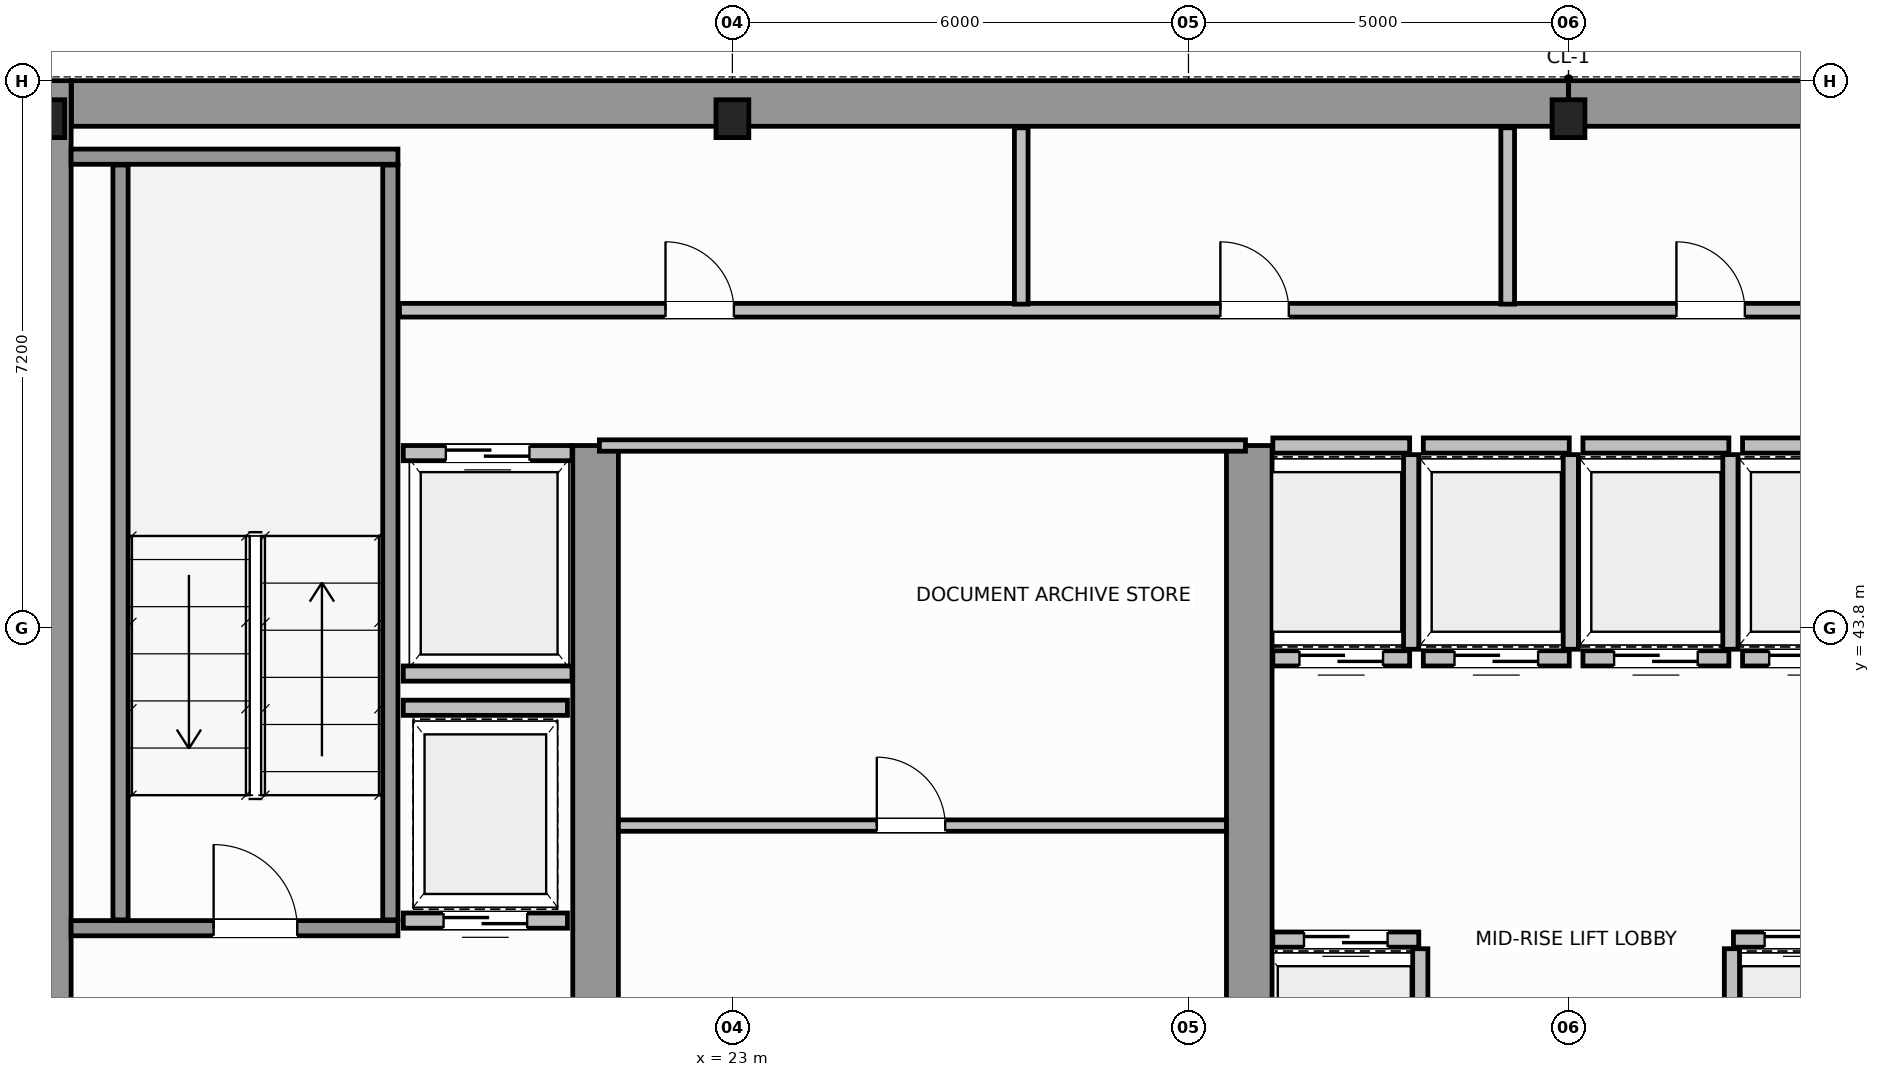
"""IFC4 building model, lengths in metres.
Left out: names, types, materials, properties, quantities, classifications, styles, units other than length and angle.
Written with IfcOpenShell. Run it as: python <this file> out.ifc"""

import sys

from ifc_helpers import new_model, si_unit, direction, frame, frame_2d, origin, origin_2d, place, context, subcontext, project, spatial, rectangle, i_section, extrude, source, transform, mapped, element, fill, save


model = new_model("IFC4")
c1 = context("Model", 3, precision=1e-05, world=origin(), true_north=direction((0.0, 1.0)))
c2 = subcontext(c1, "Body", "Model", "MODEL_VIEW")
j1 = project(units=[si_unit("LENGTHUNIT", "METRE"), si_unit("PLANEANGLEUNIT", "RADIAN")], contexts=[c1])
p1 = place(None, origin())
s1 = spatial("IfcSite", under=j1, at=p1, CompositionType="ELEMENT")
p2 = place(p1, origin())
s2 = spatial("IfcBuilding", under=s1, at=p2, CompositionType="ELEMENT")
p3 = place(p2, frame((0.0, 0.0, 195.6)))
s3 = spatial("IfcBuildingStorey", under=s2, at=p3, CompositionType="ELEMENT", Elevation=195.6)
m1 = source(origin(), c2, "Body", "SweptSolid", [
    extrude(i_section(OverallWidth=0.432, OverallDepth=0.498, WebThickness=0.055, FlangeThickness=0.068, FilletRadius=0.015, at=origin_2d()), origin(), (0.0, 0.0, 1.0), 3.8),
])
for number, where, z_axis, x_axis in (
    (1, (14.0, 50.5, 0.0), (0.0, 0.0, 1.0), (1.0, 0.0, 0.0)),
    (2, (23.0, 50.5, 0.0), (0.0, 0.0, 1.0), (1.0, 0.0, 0.0)),
    (3, (34.0, 50.5, 0.0), (0.0, 0.0, 1.0), (1.0, 0.0, 0.0)),
):
    element("IfcColumn", number, at=place(p3, frame(where, z_axis=z_axis, x_axis=x_axis)), inside=s3, PredefinedType="COLUMN", context=c2, shape_type="MappedRepresentation", body=[
        mapped(m1, transform((0.0, 0.0, 0.0), scale=1.0)),
    ])
for number, where, z_axis, x_axis in (
    (4, (14.304, 50.7, 0.0), (0.0, 0.0, 1.0), (1.0, 0.0, 0.0)),
    (5, (34.002, 50.7, 0.0), (0.0, 0.0, 1.0), (1.0, 0.0, 0.0)),
):
    element("IfcWall", number, at=place(p3, frame(where, z_axis=z_axis, x_axis=x_axis)), inside=s3, PredefinedType="SHEAR", context=c2, shape_type="SweptSolid", body=[
        extrude(rectangle(XDim=19.694, YDim=0.6, at=frame_2d((9.847, 0.0))), origin(), (0.0, 0.0, 1.0), 3.8),
    ])
p4 = place(p3, frame((14.0, 36.5, 0.0), z_axis=(0.0, 0.0, 1.0), x_axis=(0.0, 1.0, 0.0)))
e6 = element("IfcWall", 6, at=p4, inside=s3, PredefinedType="SHEAR", context=c2, shape_type="SweptSolid", body=[
    extrude(rectangle(XDim=14.5, YDim=0.6, at=frame_2d((7.25, 0.0))), origin(), (0.0, 0.0, 1.0), 3.8),
])
for number, where, z_axis, x_axis in (
    (7, (21.2, 36.82, 0.0), (0.0, 0.0, 1.0), (0.0, 1.0, 0.0)),
    (8, (29.8, 36.82, 0.0), (0.0, 0.0, 1.0), (0.0, 1.0, 0.0)),
):
    element("IfcWall", number, at=place(p3, frame(where, z_axis=z_axis, x_axis=x_axis)), inside=s3, PredefinedType="SHEAR", context=c2, shape_type="SweptSolid", body=[
        extrude(rectangle(XDim=9.38, YDim=0.6, at=frame_2d((4.69, 0.0))), origin(), (0.0, 0.0, 1.0), 3.8),
    ])
p5 = place(p3, frame((14.3, 39.85, 0.0), z_axis=(0.0, 0.0, 1.0), x_axis=(1.0, 0.0, 0.0)))
e9 = element("IfcWall", 9, at=p5, inside=s3, PredefinedType="SOLIDWALL", context=c2, shape_type="SweptSolid", body=[
    extrude(rectangle(XDim=4.3, YDim=0.2, at=frame_2d((2.15, 0.0))), origin(), (0.0, 0.0, 1.0), 3.8),
])
p6 = place(p5, frame((1.875, 0.0, 0.0)))
e10 = element("IfcOpeningElement", 10, at=p6, cuts=e9, PredefinedType="OPENING", context=c2, shape_type="SweptSolid", body=[
    extrude(rectangle(XDim=1.1, YDim=2.15, at=frame_2d((0.55, 1.075))), frame((0.0, 0.11, 0.0), z_axis=(0.0, -1.0, 0.0), x_axis=(1.0, 0.0, 0.0)), (0.0, 0.0, 1.0), 0.22),
])
p7 = place(p3, frame((14.3, 50.0, 0.0), z_axis=(0.0, 0.0, 1.0), x_axis=(1.0, 0.0, 0.0)))
e11 = element("IfcWall", 11, at=p7, inside=s3, PredefinedType="SOLIDWALL", context=c2, shape_type="SweptSolid", body=[
    extrude(rectangle(XDim=4.3, YDim=0.2, at=frame_2d((2.15, 0.0))), origin(), (0.0, 0.0, 1.0), 3.8),
])
for number, where, z_axis, x_axis in (
    (12, (14.95, 39.96, 0.0), (0.0, 0.0, 1.0), (0.0, 1.0, 0.0)),
    (13, (18.5, 39.96, 0.0), (0.0, 0.0, 1.0), (0.0, 1.0, 0.0)),
):
    element("IfcWall", number, at=place(p3, frame(where, z_axis=z_axis, x_axis=x_axis)), inside=s3, PredefinedType="SOLIDWALL", context=c2, shape_type="SweptSolid", body=[
        extrude(rectangle(XDim=9.93, YDim=0.2, at=frame_2d((4.965, 0.0))), origin(), (0.0, 0.0, 1.0), 3.8),
    ])
p8 = place(p3, frame((30.11, 39.7, 0.0), z_axis=(0.0, 0.0, 1.0), x_axis=(1.0, 0.0, 0.0)))
e14 = element("IfcWall", 14, at=p8, inside=s3, PredefinedType="SOLIDWALL", context=c2, shape_type="SweptSolid", body=[
    extrude(rectangle(XDim=1.92, YDim=0.2, at=frame_2d((0.96, 0.0))), origin(), (0.0, 0.0, 1.0), 3.58),
])
p9 = place(p8, frame((0.41, 0.0, 0.0)))
e15 = element("IfcOpeningElement", 15, at=p9, cuts=e14, PredefinedType="OPENING", context=c2, shape_type="SweptSolid", body=[
    extrude(rectangle(XDim=1.1, YDim=2.15, at=frame_2d((0.55, 1.075))), frame((0.0, 0.11, 0.0), z_axis=(0.0, -1.0, 0.0), x_axis=(1.0, 0.0, 0.0)), (0.0, 0.0, 1.0), 0.22),
])
p10 = place(p3, frame((32.05, 37.02, 0.0), z_axis=(0.0, 0.0, 1.0), x_axis=(0.0, 1.0, 0.0)))
e16 = element("IfcWall", 16, at=p10, inside=s3, PredefinedType="SOLIDWALL", context=c2, shape_type="SweptSolid", body=[
    extrude(rectangle(XDim=2.56, YDim=0.2, at=frame_2d((1.28, 0.0))), origin(), (0.0, 0.0, 1.0), 3.58),
])
p11 = place(p3, frame((36.17, 39.7, 0.0), z_axis=(0.0, 0.0, 1.0), x_axis=(1.0, 0.0, 0.0)))
e17 = element("IfcWall", 17, at=p11, inside=s3, PredefinedType="SOLIDWALL", context=c2, shape_type="SweptSolid", body=[
    extrude(rectangle(XDim=1.92, YDim=0.2, at=frame_2d((0.96, 0.0))), origin(), (0.0, 0.0, 1.0), 3.58),
])
p12 = place(p11, frame((0.41, 0.0, 0.0)))
e18 = element("IfcOpeningElement", 18, at=p12, cuts=e17, PredefinedType="OPENING", context=c2, shape_type="SweptSolid", body=[
    extrude(rectangle(XDim=1.1, YDim=2.15, at=frame_2d((0.55, 1.075))), frame((0.0, 0.11, 0.0), z_axis=(0.0, -1.0, 0.0), x_axis=(1.0, 0.0, 0.0)), (0.0, 0.0, 1.0), 0.22),
])
p13 = place(p3, frame((36.15, 37.02, 0.0), z_axis=(0.0, 0.0, 1.0), x_axis=(0.0, 1.0, 0.0)))
e19 = element("IfcWall", 19, at=p13, inside=s3, PredefinedType="SOLIDWALL", context=c2, shape_type="SweptSolid", body=[
    extrude(rectangle(XDim=2.56, YDim=0.2, at=frame_2d((1.28, 0.0))), origin(), (0.0, 0.0, 1.0), 3.58),
])
p14 = place(p3, frame((30.11, 43.4, 0.0), z_axis=(0.0, 0.0, 1.0), x_axis=(1.0, 0.0, 0.0)))
e20 = element("IfcWall", 20, at=p14, inside=s3, PredefinedType="SOLIDWALL", context=c2, shape_type="SweptSolid", body=[
    extrude(rectangle(XDim=1.8, YDim=0.2, at=frame_2d((0.9, 0.0))), origin(), (0.0, 0.0, 1.0), 3.58),
])
p15 = place(p14, frame((0.35, 0.0, 0.0)))
e21 = element("IfcOpeningElement", 21, at=p15, cuts=e20, PredefinedType="OPENING", context=c2, shape_type="SweptSolid", body=[
    extrude(rectangle(XDim=1.1, YDim=2.15, at=frame_2d((0.55, 1.075))), frame((0.0, 0.11, 0.0), z_axis=(0.0, -1.0, 0.0), x_axis=(1.0, 0.0, 0.0)), (0.0, 0.0, 1.0), 0.22),
])
p16 = place(p3, frame((30.11, 46.2, 0.0), z_axis=(0.0, 0.0, 1.0), x_axis=(1.0, 0.0, 0.0)))
e22 = element("IfcWall", 22, at=p16, inside=s3, PredefinedType="SOLIDWALL", context=c2, shape_type="SweptSolid", body=[
    extrude(rectangle(XDim=1.8, YDim=0.2, at=frame_2d((0.9, 0.0))), origin(), (0.0, 0.0, 1.0), 3.58),
])
p17 = place(p3, frame((31.93, 43.52, 0.0), z_axis=(0.0, 0.0, 1.0), x_axis=(0.0, 1.0, 0.0)))
e23 = element("IfcWall", 23, at=p17, inside=s3, PredefinedType="SOLIDWALL", context=c2, shape_type="SweptSolid", body=[
    extrude(rectangle(XDim=2.56, YDim=0.2, at=frame_2d((1.28, 0.0))), origin(), (0.0, 0.0, 1.0), 3.58),
])
p18 = place(p3, frame((32.09, 43.4, 0.0), z_axis=(0.0, 0.0, 1.0), x_axis=(1.0, 0.0, 0.0)))
e24 = element("IfcWall", 24, at=p18, inside=s3, PredefinedType="SOLIDWALL", context=c2, shape_type="SweptSolid", body=[
    extrude(rectangle(XDim=1.92, YDim=0.2, at=frame_2d((0.96, 0.0))), origin(), (0.0, 0.0, 1.0), 3.58),
])
p19 = place(p18, frame((0.41, 0.0, 0.0)))
e25 = element("IfcOpeningElement", 25, at=p19, cuts=e24, PredefinedType="OPENING", context=c2, shape_type="SweptSolid", body=[
    extrude(rectangle(XDim=1.1, YDim=2.15, at=frame_2d((0.55, 1.075))), frame((0.0, 0.11, 0.0), z_axis=(0.0, -1.0, 0.0), x_axis=(1.0, 0.0, 0.0)), (0.0, 0.0, 1.0), 0.22),
])
p20 = place(p3, frame((32.09, 46.2, 0.0), z_axis=(0.0, 0.0, 1.0), x_axis=(1.0, 0.0, 0.0)))
e26 = element("IfcWall", 26, at=p20, inside=s3, PredefinedType="SOLIDWALL", context=c2, shape_type="SweptSolid", body=[
    extrude(rectangle(XDim=1.92, YDim=0.2, at=frame_2d((0.96, 0.0))), origin(), (0.0, 0.0, 1.0), 3.58),
])
p21 = place(p3, frame((34.03, 43.52, 0.0), z_axis=(0.0, 0.0, 1.0), x_axis=(0.0, 1.0, 0.0)))
e27 = element("IfcWall", 27, at=p21, inside=s3, PredefinedType="SOLIDWALL", context=c2, shape_type="SweptSolid", body=[
    extrude(rectangle(XDim=2.56, YDim=0.2, at=frame_2d((1.28, 0.0))), origin(), (0.0, 0.0, 1.0), 3.58),
])
p22 = place(p3, frame((34.19, 43.4, 0.0), z_axis=(0.0, 0.0, 1.0), x_axis=(1.0, 0.0, 0.0)))
e28 = element("IfcWall", 28, at=p22, inside=s3, PredefinedType="SOLIDWALL", context=c2, shape_type="SweptSolid", body=[
    extrude(rectangle(XDim=1.92, YDim=0.2, at=frame_2d((0.96, 0.0))), origin(), (0.0, 0.0, 1.0), 3.58),
])
p23 = place(p22, frame((0.41, 0.0, 0.0)))
e29 = element("IfcOpeningElement", 29, at=p23, cuts=e28, PredefinedType="OPENING", context=c2, shape_type="SweptSolid", body=[
    extrude(rectangle(XDim=1.1, YDim=2.15, at=frame_2d((0.55, 1.075))), frame((0.0, 0.11, 0.0), z_axis=(0.0, -1.0, 0.0), x_axis=(1.0, 0.0, 0.0)), (0.0, 0.0, 1.0), 0.22),
])
p24 = place(p3, frame((34.19, 46.2, 0.0), z_axis=(0.0, 0.0, 1.0), x_axis=(1.0, 0.0, 0.0)))
e30 = element("IfcWall", 30, at=p24, inside=s3, PredefinedType="SOLIDWALL", context=c2, shape_type="SweptSolid", body=[
    extrude(rectangle(XDim=1.92, YDim=0.2, at=frame_2d((0.96, 0.0))), origin(), (0.0, 0.0, 1.0), 3.58),
])
p25 = place(p3, frame((36.13, 43.52, 0.0), z_axis=(0.0, 0.0, 1.0), x_axis=(0.0, 1.0, 0.0)))
e31 = element("IfcWall", 31, at=p25, inside=s3, PredefinedType="SOLIDWALL", context=c2, shape_type="SweptSolid", body=[
    extrude(rectangle(XDim=2.56, YDim=0.2, at=frame_2d((1.28, 0.0))), origin(), (0.0, 0.0, 1.0), 3.58),
])
p26 = place(p3, frame((36.29, 43.4, 0.0), z_axis=(0.0, 0.0, 1.0), x_axis=(1.0, 0.0, 0.0)))
e32 = element("IfcWall", 32, at=p26, inside=s3, PredefinedType="SOLIDWALL", context=c2, shape_type="SweptSolid", body=[
    extrude(rectangle(XDim=1.8, YDim=0.2, at=frame_2d((0.9, 0.0))), origin(), (0.0, 0.0, 1.0), 3.58),
])
p27 = place(p26, frame((0.35, 0.0, 0.0)))
e33 = element("IfcOpeningElement", 33, at=p27, cuts=e32, PredefinedType="OPENING", context=c2, shape_type="SweptSolid", body=[
    extrude(rectangle(XDim=1.1, YDim=2.15, at=frame_2d((0.55, 1.075))), frame((0.0, 0.11, 0.0), z_axis=(0.0, -1.0, 0.0), x_axis=(1.0, 0.0, 0.0)), (0.0, 0.0, 1.0), 0.22),
])
p28 = place(p3, frame((36.29, 46.2, 0.0), z_axis=(0.0, 0.0, 1.0), x_axis=(1.0, 0.0, 0.0)))
e34 = element("IfcWall", 34, at=p28, inside=s3, PredefinedType="SOLIDWALL", context=c2, shape_type="SweptSolid", body=[
    extrude(rectangle(XDim=1.8, YDim=0.2, at=frame_2d((0.9, 0.0))), origin(), (0.0, 0.0, 1.0), 3.58),
])
p29 = place(p3, frame((18.67, 46.1, 0.0), z_axis=(0.0, 0.0, 1.0), x_axis=(1.0, 0.0, 0.0)))
e35 = element("IfcWall", 35, at=p29, inside=s3, PredefinedType="SOLIDWALL", context=c2, shape_type="SweptSolid", body=[
    extrude(rectangle(XDim=2.22, YDim=0.2, at=frame_2d((1.11, 0.0))), origin(), (0.0, 0.0, 1.0), 3.58),
])
p30 = place(p29, frame((0.56, 0.0, 0.0)))
e36 = element("IfcOpeningElement", 36, at=p30, cuts=e35, PredefinedType="OPENING", context=c2, shape_type="SweptSolid", body=[
    extrude(rectangle(XDim=1.1, YDim=2.15, at=frame_2d((0.55, 1.075))), frame((0.0, 0.11, 0.0), z_axis=(0.0, -1.0, 0.0), x_axis=(1.0, 0.0, 0.0)), (0.0, 0.0, 1.0), 0.22),
])
p31 = place(p3, frame((18.67, 43.2, 0.0), z_axis=(0.0, 0.0, 1.0), x_axis=(1.0, 0.0, 0.0)))
e37 = element("IfcWall", 37, at=p31, inside=s3, PredefinedType="SOLIDWALL", context=c2, shape_type="SweptSolid", body=[
    extrude(rectangle(XDim=2.22, YDim=0.2, at=frame_2d((1.11, 0.0))), origin(), (0.0, 0.0, 1.0), 3.58),
])
p32 = place(p3, frame((18.67, 39.95, 0.0), z_axis=(0.0, 0.0, 1.0), x_axis=(1.0, 0.0, 0.0)))
e38 = element("IfcWall", 38, at=p32, inside=s3, PredefinedType="SOLIDWALL", context=c2, shape_type="SweptSolid", body=[
    extrude(rectangle(XDim=2.16, YDim=0.2, at=frame_2d((1.08, 0.0))), origin(), (0.0, 0.0, 1.0), 3.58),
])
p33 = place(p32, frame((0.53, 0.0, 0.0)))
e39 = element("IfcOpeningElement", 39, at=p33, cuts=e38, PredefinedType="OPENING", context=c2, shape_type="SweptSolid", body=[
    extrude(rectangle(XDim=1.1, YDim=2.15, at=frame_2d((0.55, 1.075))), frame((0.0, 0.11, 0.0), z_axis=(0.0, -1.0, 0.0), x_axis=(1.0, 0.0, 0.0)), (0.0, 0.0, 1.0), 0.22),
])
p34 = place(p3, frame((18.67, 42.75, 0.0), z_axis=(0.0, 0.0, 1.0), x_axis=(1.0, 0.0, 0.0)))
e40 = element("IfcWall", 40, at=p34, inside=s3, PredefinedType="SOLIDWALL", context=c2, shape_type="SweptSolid", body=[
    extrude(rectangle(XDim=2.16, YDim=0.2, at=frame_2d((1.08, 0.0))), origin(), (0.0, 0.0, 1.0), 3.58),
])
p35 = place(p3, frame((21.25, 46.2, 0.0), z_axis=(0.0, 0.0, 1.0), x_axis=(1.0, 0.0, 0.0)))
e41 = element("IfcWall", 41, at=p35, inside=s3, PredefinedType="PARTITIONING", context=c2, shape_type="SweptSolid", body=[
    extrude(rectangle(XDim=8.5, YDim=0.15, at=frame_2d((4.25, 0.0))), origin(), (0.0, 0.0, 1.0), 3.58),
])
p36 = place(p3, frame((21.5, 41.2, 0.0), z_axis=(0.0, 0.0, 1.0), x_axis=(1.0, 0.0, 0.0)))
e42 = element("IfcWall", 42, at=p36, inside=s3, PredefinedType="PARTITIONING", context=c2, shape_type="SweptSolid", body=[
    extrude(rectangle(XDim=8.0, YDim=0.15, at=frame_2d((4.0, 0.0))), origin(), (0.0, 0.0, 1.0), 3.58),
])
p37 = place(p36, frame((3.4, 0.0, 0.0)))
e43 = element("IfcOpeningElement", 43, at=p37, cuts=e42, PredefinedType="OPENING", context=c2, shape_type="SweptSolid", body=[
    extrude(rectangle(XDim=0.9, YDim=2.1, at=frame_2d((0.45, 1.05))), frame((0.0, 0.085, 0.0), z_axis=(0.0, -1.0, 0.0), x_axis=(1.0, 0.0, 0.0)), (0.0, 0.0, 1.0), 0.17),
])
p38 = place(p3, frame((18.62, 47.98, 0.0), z_axis=(0.0, 0.0, 1.0), x_axis=(1.0, 0.0, 0.0)))
e44 = element("IfcWall", 44, at=p38, inside=s3, PredefinedType="PLUMBINGWALL", context=c2, shape_type="SweptSolid", body=[
    extrude(rectangle(XDim=20.06, YDim=0.18, at=frame_2d((10.03, 0.0))), origin(), (0.0, 0.0, 1.0), 3.58),
])
p39 = place(p38, frame((3.5, 0.0, 0.0)))
e45 = element("IfcOpeningElement", 45, at=p39, cuts=e44, PredefinedType="OPENING", context=c2, shape_type="SweptSolid", body=[
    extrude(rectangle(XDim=0.9, YDim=2.15, at=frame_2d((0.45, 1.075))), frame((0.0, 0.1, 0.0), z_axis=(0.0, -1.0, 0.0), x_axis=(1.0, 0.0, 0.0)), (0.0, 0.0, 1.0), 0.2),
])
p40 = place(p38, frame((10.8, 0.0, 0.0)))
e46 = element("IfcOpeningElement", 46, at=p40, cuts=e44, PredefinedType="OPENING", context=c2, shape_type="SweptSolid", body=[
    extrude(rectangle(XDim=0.9, YDim=2.15, at=frame_2d((0.45, 1.075))), frame((0.0, 0.1, 0.0), z_axis=(0.0, -1.0, 0.0), x_axis=(1.0, 0.0, 0.0)), (0.0, 0.0, 1.0), 0.2),
])
p41 = place(p38, frame((16.8, 0.0, 0.0)))
e47 = element("IfcOpeningElement", 47, at=p41, cuts=e44, PredefinedType="OPENING", context=c2, shape_type="SweptSolid", body=[
    extrude(rectangle(XDim=0.9, YDim=2.15, at=frame_2d((0.45, 1.075))), frame((0.0, 0.1, 0.0), z_axis=(0.0, -1.0, 0.0), x_axis=(1.0, 0.0, 0.0)), (0.0, 0.0, 1.0), 0.2),
])
for number, where, z_axis, x_axis in (
    (48, (26.8, 48.06, 0.0), (0.0, 0.0, 1.0), (0.0, 1.0, 0.0)),
    (49, (33.2, 48.06, 0.0), (0.0, 0.0, 1.0), (0.0, 1.0, 0.0)),
):
    element("IfcWall", number, at=place(p3, frame(where, z_axis=z_axis, x_axis=x_axis)), inside=s3, PredefinedType="PLUMBINGWALL", context=c2, shape_type="SweptSolid", body=[
        extrude(rectangle(XDim=2.32, YDim=0.18, at=frame_2d((1.16, 0.0))), origin(), (0.0, 0.0, 1.0), 3.58),
    ])
m2 = source(origin(), c2, "Body", "SweptSolid", [
    extrude(rectangle(XDim=1.1, YDim=2.15, at=frame_2d((0.55, 1.075))), frame((0.0, 0.025, 0.0), z_axis=(0.0, -1.0, 0.0), x_axis=(1.0, 0.0, 0.0)), (0.0, 0.0, 1.0), 0.05),
])
p42 = place(p6, origin())
e50 = element("IfcDoor", 50, at=p42, inside=s3, OperationType="SINGLE_SWING_LEFT", PredefinedType="DOOR", context=c2, shape_type="MappedRepresentation", body=[
    mapped(m2, transform((0.0, 0.0, 0.0), scale=1.0)),
])
fill(e10, e50)
p43 = place(p9, origin())
e51 = element("IfcDoor", 51, at=p43, inside=s3, OperationType="DOUBLE_DOOR_SLIDING", PredefinedType="DOOR", context=c2, shape_type="MappedRepresentation", body=[
    mapped(m2, transform((0.0, 0.0, 0.0), scale=1.0)),
])
fill(e15, e51)
p44 = place(p12, origin())
e52 = element("IfcDoor", 52, at=p44, inside=s3, OperationType="DOUBLE_DOOR_SLIDING", PredefinedType="DOOR", context=c2, shape_type="MappedRepresentation", body=[
    mapped(m2, transform((0.0, 0.0, 0.0), scale=1.0)),
])
fill(e18, e52)
p45 = place(p15, origin())
e53 = element("IfcDoor", 53, at=p45, inside=s3, OperationType="DOUBLE_DOOR_SLIDING", PredefinedType="DOOR", context=c2, shape_type="MappedRepresentation", body=[
    mapped(m2, transform((0.0, 0.0, 0.0), scale=1.0)),
])
fill(e21, e53)
p46 = place(p19, origin())
e54 = element("IfcDoor", 54, at=p46, inside=s3, OperationType="DOUBLE_DOOR_SLIDING", PredefinedType="DOOR", context=c2, shape_type="MappedRepresentation", body=[
    mapped(m2, transform((0.0, 0.0, 0.0), scale=1.0)),
])
fill(e25, e54)
p47 = place(p23, origin())
e55 = element("IfcDoor", 55, at=p47, inside=s3, OperationType="DOUBLE_DOOR_SLIDING", PredefinedType="DOOR", context=c2, shape_type="MappedRepresentation", body=[
    mapped(m2, transform((0.0, 0.0, 0.0), scale=1.0)),
])
fill(e29, e55)
p48 = place(p27, origin())
e56 = element("IfcDoor", 56, at=p48, inside=s3, OperationType="DOUBLE_DOOR_SLIDING", PredefinedType="DOOR", context=c2, shape_type="MappedRepresentation", body=[
    mapped(m2, transform((0.0, 0.0, 0.0), scale=1.0)),
])
fill(e33, e56)
p49 = place(p30, origin())
e57 = element("IfcDoor", 57, at=p49, inside=s3, OperationType="DOUBLE_DOOR_SLIDING", PredefinedType="DOOR", context=c2, shape_type="MappedRepresentation", body=[
    mapped(m2, transform((0.0, 0.0, 0.0), scale=1.0)),
])
fill(e36, e57)
p50 = place(p33, origin())
e58 = element("IfcDoor", 58, at=p50, inside=s3, OperationType="DOUBLE_DOOR_SLIDING", PredefinedType="DOOR", context=c2, shape_type="MappedRepresentation", body=[
    mapped(m2, transform((0.0, 0.0, 0.0), scale=1.0)),
])
fill(e39, e58)
m3 = source(origin(), c2, "Body", "SweptSolid", [
    extrude(rectangle(XDim=0.9, YDim=2.1, at=frame_2d((0.45, 1.05))), frame((0.0, 0.025, 0.0), z_axis=(0.0, -1.0, 0.0), x_axis=(1.0, 0.0, 0.0)), (0.0, 0.0, 1.0), 0.05),
])
p51 = place(p37, origin())
e59 = element("IfcDoor", 59, at=p51, inside=s3, OperationType="SINGLE_SWING_RIGHT", PredefinedType="DOOR", context=c2, shape_type="MappedRepresentation", body=[
    mapped(m3, transform((0.0, 0.0, 0.0), scale=1.0)),
])
fill(e43, e59)
m4 = source(origin(), c2, "Body", "SweptSolid", [
    extrude(rectangle(XDim=0.9, YDim=2.15, at=frame_2d((0.45, 1.075))), frame((0.0, 0.025, 0.0), z_axis=(0.0, -1.0, 0.0), x_axis=(1.0, 0.0, 0.0)), (0.0, 0.0, 1.0), 0.05),
])
p52 = place(p39, origin())
e60 = element("IfcDoor", 60, at=p52, inside=s3, OperationType="SINGLE_SWING_LEFT", PredefinedType="DOOR", context=c2, shape_type="MappedRepresentation", body=[
    mapped(m4, transform((0.0, 0.0, 0.0), scale=1.0)),
])
fill(e45, e60)
p53 = place(p40, origin())
e61 = element("IfcDoor", 61, at=p53, inside=s3, OperationType="SINGLE_SWING_RIGHT", PredefinedType="DOOR", context=c2, shape_type="MappedRepresentation", body=[
    mapped(m4, transform((0.0, 0.0, 0.0), scale=1.0)),
])
fill(e46, e61)
p54 = place(p41, origin())
e62 = element("IfcDoor", 62, at=p54, inside=s3, OperationType="SINGLE_SWING_LEFT", PredefinedType="DOOR", context=c2, shape_type="MappedRepresentation", body=[
    mapped(m4, transform((0.0, 0.0, 0.0), scale=1.0)),
])
fill(e47, e62)
save(model, sys.argv[1])
